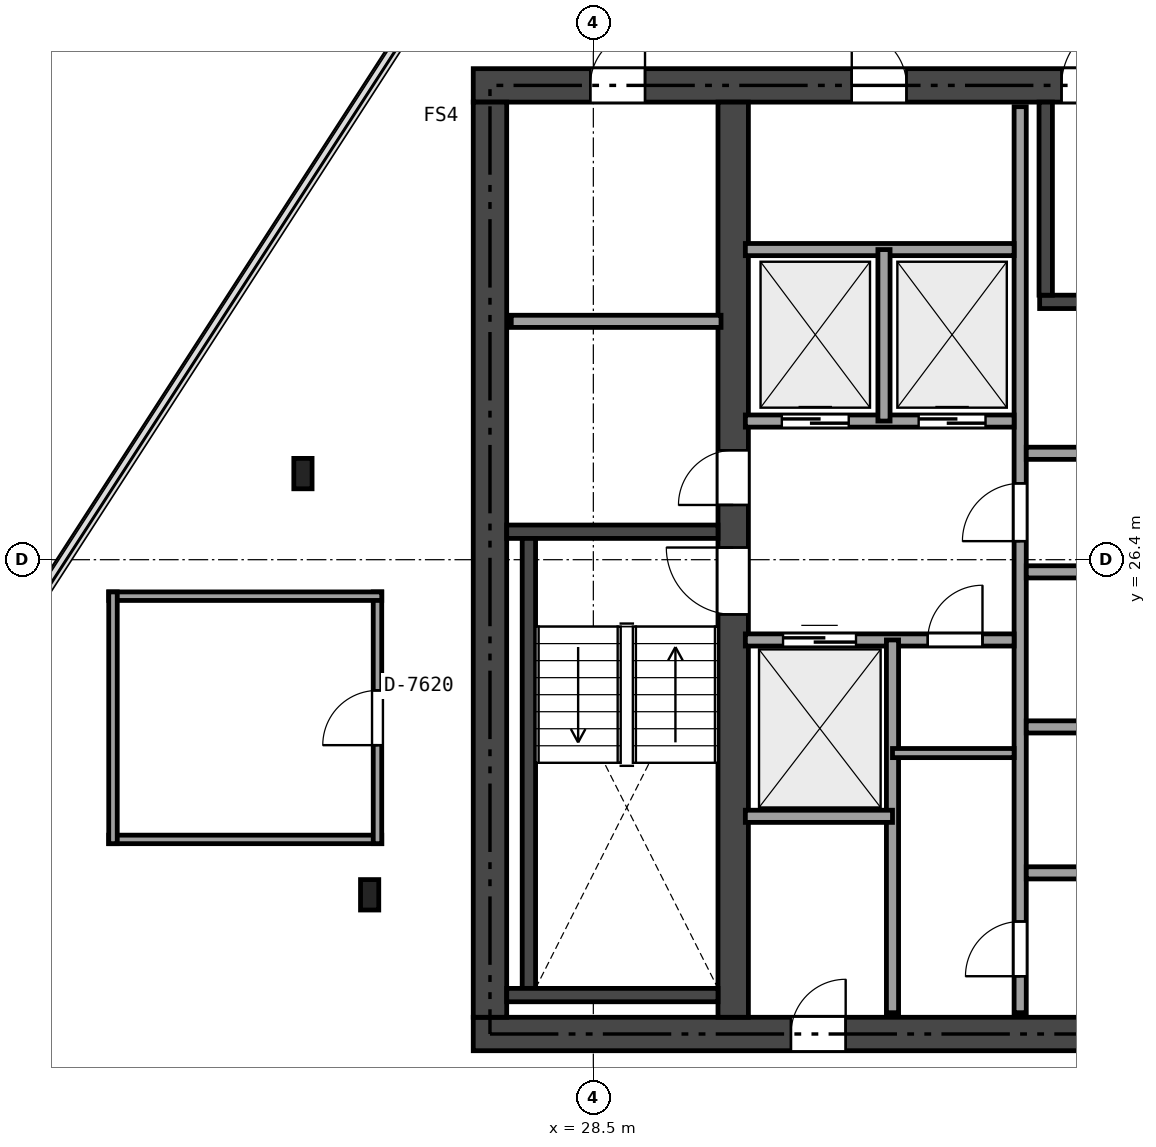
"""IFC4 building model, lengths in metres.
Left out: names, types, materials, properties, quantities, classifications, styles, units other than length and angle.
Written with IfcOpenShell. Run it as: python <this file> out.ifc"""

import sys

from ifc_helpers import new_model, si_unit, direction, frame, frame_2d, origin, origin_2d, place, context, subcontext, project, spatial, rectangle, i_section, extrude, element, fill, save


model = new_model("IFC4")
c1 = context("Model", 3, precision=1e-05, world=origin(), true_north=direction((0.0, 1.0)))
c2 = subcontext(c1, "Body", "Model", "MODEL_VIEW")
j1 = project(units=[si_unit("LENGTHUNIT", "METRE"), si_unit("PLANEANGLEUNIT", "RADIAN")], contexts=[c1])
p1 = place(None, origin())
s1 = spatial("IfcSite", under=j1, at=p1, CompositionType="ELEMENT")
p2 = place(p1, origin())
s2 = spatial("IfcBuilding", under=s1, at=p2, CompositionType="ELEMENT")
p3 = place(p2, frame((0.0, 0.0, 283.5)))
s3 = spatial("IfcBuildingStorey", under=s2, at=p3, CompositionType="ELEMENT", Elevation=283.5)
p4 = place(p3, frame((26.525, 18.6, 0.0), z_axis=(0.0, 0.0, 1.0), x_axis=(1.0, 0.0, 0.0)))
e1 = element("IfcWall", 1, at=p4, inside=s3, PredefinedType="SHEAR", context=c2, shape_type="SweptSolid", body=[
    extrude(rectangle(XDim=21.35, YDim=0.55, at=frame_2d((10.675, 0.0))), origin(), (0.0, 0.0, 1.0), 2.84),
])
p5 = place(p4, frame((12.4, 0.0, 0.0)))
e2 = element("IfcOpeningElement", 2, at=p5, cuts=e1, PredefinedType="OPENING", context=c2, shape_type="SweptSolid", body=[
    extrude(rectangle(XDim=1.15, YDim=2.15, at=frame_2d((0.575, 1.075))), frame((0.0, 0.285, 0.0), z_axis=(0.0, -1.0, 0.0), x_axis=(1.0, 0.0, 0.0)), (0.0, 0.0, 1.0), 0.57),
])
p6 = place(p4, frame((5.225, 0.0, 0.0)))
e3 = element("IfcOpeningElement", 3, at=p6, cuts=e1, PredefinedType="OPENING", context=c2, shape_type="SweptSolid", body=[
    extrude(rectangle(XDim=0.9, YDim=2.1, at=frame_2d((0.45, 1.05))), frame((0.0, 0.285, 0.0), z_axis=(0.0, -1.0, 0.0), x_axis=(1.0, 0.0, 0.0)), (0.0, 0.0, 1.0), 0.57),
])
p7 = place(p3, frame((26.525, 34.2, 0.0), z_axis=(0.0, 0.0, 1.0), x_axis=(1.0, 0.0, 0.0)))
e4 = element("IfcWall", 4, at=p7, inside=s3, PredefinedType="SHEAR", context=c2, shape_type="SweptSolid", body=[
    extrude(rectangle(XDim=21.35, YDim=0.55, at=frame_2d((10.675, 0.0))), origin(), (0.0, 0.0, 1.0), 2.84),
])
p8 = place(p7, frame((9.675, 0.0, 0.0)))
e5 = element("IfcOpeningElement", 5, at=p8, cuts=e4, PredefinedType="OPENING", context=c2, shape_type="SweptSolid", body=[
    extrude(rectangle(XDim=1.1, YDim=2.15, at=frame_2d((0.55, 1.075))), frame((0.0, 0.285, 0.0), z_axis=(0.0, -1.0, 0.0), x_axis=(1.0, 0.0, 0.0)), (0.0, 0.0, 1.0), 0.57),
])
p9 = place(p7, frame((1.925, 0.0, 0.0)))
e6 = element("IfcOpeningElement", 6, at=p9, cuts=e4, PredefinedType="OPENING", context=c2, shape_type="SweptSolid", body=[
    extrude(rectangle(XDim=0.9, YDim=2.1, at=frame_2d((0.45, 1.05))), frame((0.0, 0.285, 0.0), z_axis=(0.0, -1.0, 0.0), x_axis=(1.0, 0.0, 0.0)), (0.0, 0.0, 1.0), 0.57),
])
p10 = place(p7, frame((6.225, 0.0, 0.0)))
e7 = element("IfcOpeningElement", 7, at=p10, cuts=e4, PredefinedType="OPENING", context=c2, shape_type="SweptSolid", body=[
    extrude(rectangle(XDim=0.9, YDim=2.1, at=frame_2d((0.45, 1.05))), frame((0.0, 0.285, 0.0), z_axis=(0.0, -1.0, 0.0), x_axis=(1.0, 0.0, 0.0)), (0.0, 0.0, 1.0), 0.57),
])
p11 = place(p3, frame((26.8, 18.875, 0.0), z_axis=(0.0, 0.0, 1.0), x_axis=(0.0, 1.0, 0.0)))
e8 = element("IfcWall", 8, at=p11, inside=s3, PredefinedType="SHEAR", context=c2, shape_type="SweptSolid", body=[
    extrude(rectangle(XDim=15.05, YDim=0.55, at=frame_2d((7.525, 0.0))), origin(), (0.0, 0.0, 1.0), 2.84),
])
p12 = place(p3, frame((30.8, 18.875, 0.0), z_axis=(0.0, 0.0, 1.0), x_axis=(0.0, 1.0, 0.0)))
e9 = element("IfcWall", 9, at=p12, inside=s3, PredefinedType="SHEAR", context=c2, shape_type="SweptSolid", body=[
    extrude(rectangle(XDim=15.05, YDim=0.5, at=frame_2d((7.525, 0.0))), origin(), (0.0, 0.0, 1.0), 2.84),
])
p13 = place(p12, frame((6.625, 0.0, 0.0)))
e10 = element("IfcOpeningElement", 10, at=p13, cuts=e9, PredefinedType="OPENING", context=c2, shape_type="SweptSolid", body=[
    extrude(rectangle(XDim=1.1, YDim=2.15, at=frame_2d((0.55, 1.075))), frame((0.0, 0.26, 0.0), z_axis=(0.0, -1.0, 0.0), x_axis=(1.0, 0.0, 0.0)), (0.0, 0.0, 1.0), 0.52),
])
p14 = place(p12, frame((8.425, 0.0, 0.0)))
e11 = element("IfcOpeningElement", 11, at=p14, cuts=e9, PredefinedType="OPENING", context=c2, shape_type="SweptSolid", body=[
    extrude(rectangle(XDim=0.9, YDim=2.1, at=frame_2d((0.45, 1.05))), frame((0.0, 0.26, 0.0), z_axis=(0.0, -1.0, 0.0), x_axis=(1.0, 0.0, 0.0)), (0.0, 0.0, 1.0), 0.52),
])
p15 = place(p3, frame((27.075, 26.86, 0.0), z_axis=(0.0, 0.0, 1.0), x_axis=(1.0, 0.0, 0.0)))
e12 = element("IfcWall", 12, at=p15, inside=s3, PredefinedType="SHEAR", context=c2, shape_type="SweptSolid", body=[
    extrude(rectangle(XDim=3.475, YDim=0.22, at=frame_2d((1.738, 0.0))), origin(), (0.0, 0.0, 1.0), 2.84),
])
p16 = place(p3, frame((27.44, 19.35, 0.0), z_axis=(0.0, 0.0, 1.0), x_axis=(0.0, 1.0, 0.0)))
e13 = element("IfcWall", 13, at=p16, inside=s3, PredefinedType="SHEAR", context=c2, shape_type="SweptSolid", body=[
    extrude(rectangle(XDim=7.4, YDim=0.22, at=frame_2d((3.7, 0.0))), origin(), (0.0, 0.0, 1.0), 2.84),
])
p17 = place(p3, frame((27.075, 19.24, 0.0), z_axis=(0.0, 0.0, 1.0), x_axis=(1.0, 0.0, 0.0)))
e14 = element("IfcWall", 14, at=p17, inside=s3, PredefinedType="SHEAR", context=c2, shape_type="SweptSolid", body=[
    extrude(rectangle(XDim=3.475, YDim=0.22, at=frame_2d((1.738, 0.0))), origin(), (0.0, 0.0, 1.0), 2.84),
])
p18 = place(p3, frame((35.84, 30.64, 0.0), z_axis=(0.0, 0.0, 1.0), x_axis=(1.0, 0.0, 0.0)))
e15 = element("IfcWall", 15, at=p18, inside=s3, PredefinedType="SHEAR", context=c2, shape_type="SweptSolid", body=[
    extrude(rectangle(XDim=7.61, YDim=0.22, at=frame_2d((3.805, 0.0))), origin(), (0.0, 0.0, 1.0), 2.84),
])
p19 = place(p3, frame((35.94, 30.75, 0.0), z_axis=(0.0, 0.0, 1.0), x_axis=(0.0, 1.0, 0.0)))
e16 = element("IfcWall", 16, at=p19, inside=s3, PredefinedType="SHEAR", context=c2, shape_type="SweptSolid", body=[
    extrude(rectangle(XDim=3.175, YDim=0.22, at=frame_2d((1.587, 0.0))), origin(), (0.0, 0.0, 1.0), 2.84),
])
for number, where, z_axis, x_axis in (
    (17, (23.724, 27.816, 0.0), (0.0, 0.0, 1.0), (1.0, 0.0, 0.0)),
    (18, (24.821, 20.889, 0.0), (0.0, 0.0, 1.0), (1.0, 0.0, 0.0)),
):
    element("IfcColumn", number, at=place(p3, frame(where, z_axis=z_axis, x_axis=x_axis)), inside=s3, PredefinedType="COLUMN", context=c2, shape_type="SweptSolid", body=[
        extrude(i_section(OverallWidth=0.3, OverallDepth=0.5, WebThickness=0.015, FlangeThickness=0.028, at=origin_2d()), origin(), (0.0, 0.0, 1.0), 2.84),
    ])
p20 = place(p3, frame((27.15, 30.32, 0.0), z_axis=(0.0, 0.0, 1.0), x_axis=(1.0, 0.0, 0.0)))
e19 = element("IfcWall", 19, at=p20, inside=s3, PredefinedType="SOLIDWALL", context=c2, shape_type="SweptSolid", body=[
    extrude(rectangle(XDim=3.45, YDim=0.2, at=frame_2d((1.725, 0.0))), origin(), (0.0, 0.0, 1.0), 2.84),
])
p21 = place(p3, frame((35.52, 18.95, 0.0), z_axis=(0.0, 0.0, 1.0), x_axis=(0.0, 1.0, 0.0)))
e20 = element("IfcWall", 20, at=p21, inside=s3, PredefinedType="SOLIDWALL", context=c2, shape_type="SweptSolid", body=[
    extrude(rectangle(XDim=14.9, YDim=0.2, at=frame_2d((7.45, 0.0))), origin(), (0.0, 0.0, 1.0), 2.361),
])
p22 = place(p21, frame((7.755, 0.0, 0.0)))
e21 = element("IfcOpeningElement", 21, at=p22, cuts=e20, PredefinedType="OPENING", context=c2, shape_type="SweptSolid", body=[
    extrude(rectangle(XDim=0.95, YDim=2.15, at=frame_2d((0.475, 1.075))), frame((0.0, 0.11, 0.0), z_axis=(0.0, -1.0, 0.0), x_axis=(1.0, 0.0, 0.0)), (0.0, 0.0, 1.0), 0.22),
])
p23 = place(p21, frame((0.6, 0.0, 0.0)))
e22 = element("IfcOpeningElement", 22, at=p23, cuts=e20, PredefinedType="OPENING", context=c2, shape_type="SweptSolid", body=[
    extrude(rectangle(XDim=0.9, YDim=2.1, at=frame_2d((0.45, 1.05))), frame((0.0, 0.11, 0.0), z_axis=(0.0, -1.0, 0.0), x_axis=(1.0, 0.0, 0.0)), (0.0, 0.0, 1.0), 0.22),
])
p24 = place(p3, frame((31.0, 28.68, 0.0), z_axis=(0.0, 0.0, 1.0), x_axis=(1.0, 0.0, 0.0)))
e23 = element("IfcWall", 23, at=p24, inside=s3, PredefinedType="SOLIDWALL", context=c2, shape_type="SweptSolid", body=[
    extrude(rectangle(XDim=4.42, YDim=0.2, at=frame_2d((2.21, 0.0))), origin(), (0.0, 0.0, 1.0), 2.84),
])
p25 = place(p24, frame((0.6, 0.0, 0.0)))
e24 = element("IfcOpeningElement", 24, at=p25, cuts=e23, PredefinedType="OPENING", context=c2, shape_type="SweptSolid", body=[
    extrude(rectangle(XDim=1.1, YDim=2.15, at=frame_2d((0.55, 1.075))), frame((0.0, 0.11, 0.0), z_axis=(0.0, -1.0, 0.0), x_axis=(1.0, 0.0, 0.0)), (0.0, 0.0, 1.0), 0.22),
])
p26 = place(p24, frame((2.85, 0.0, 0.0)))
e25 = element("IfcOpeningElement", 25, at=p26, cuts=e23, PredefinedType="OPENING", context=c2, shape_type="SweptSolid", body=[
    extrude(rectangle(XDim=1.1, YDim=2.15, at=frame_2d((0.55, 1.075))), frame((0.0, 0.11, 0.0), z_axis=(0.0, -1.0, 0.0), x_axis=(1.0, 0.0, 0.0)), (0.0, 0.0, 1.0), 0.22),
])
p27 = place(p3, frame((31.0, 31.5, 0.0), z_axis=(0.0, 0.0, 1.0), x_axis=(1.0, 0.0, 0.0)))
e26 = element("IfcWall", 26, at=p27, inside=s3, PredefinedType="SOLIDWALL", context=c2, shape_type="SweptSolid", body=[
    extrude(rectangle(XDim=4.42, YDim=0.2, at=frame_2d((2.21, 0.0))), origin(), (0.0, 0.0, 1.0), 2.84),
])
p28 = place(p3, frame((33.28, 28.68, 0.0), z_axis=(0.0, 0.0, 1.0), x_axis=(0.0, 1.0, 0.0)))
e27 = element("IfcWall", 27, at=p28, inside=s3, PredefinedType="SOLIDWALL", context=c2, shape_type="SweptSolid", body=[
    extrude(rectangle(XDim=2.82, YDim=0.2, at=frame_2d((1.41, 0.0))), origin(), (0.0, 0.0, 1.0), 2.84),
])
p29 = place(p3, frame((31.0, 25.08, 0.0), z_axis=(0.0, 0.0, 1.0), x_axis=(1.0, 0.0, 0.0)))
e28 = element("IfcWall", 28, at=p29, inside=s3, PredefinedType="SOLIDWALL", context=c2, shape_type="SweptSolid", body=[
    extrude(rectangle(XDim=4.42, YDim=0.2, at=frame_2d((2.21, 0.0))), origin(), (0.0, 0.0, 1.0), 2.84),
])
p30 = place(p29, frame((3.0, 0.0, 0.0)))
e29 = element("IfcOpeningElement", 29, at=p30, cuts=e28, PredefinedType="OPENING", context=c2, shape_type="SweptSolid", body=[
    extrude(rectangle(XDim=0.9, YDim=2.1, at=frame_2d((0.45, 1.05))), frame((0.0, 0.11, 0.0), z_axis=(0.0, -1.0, 0.0), x_axis=(1.0, 0.0, 0.0)), (0.0, 0.0, 1.0), 0.22),
])
p31 = place(p29, frame((0.62, 0.0, 0.0)))
e30 = element("IfcOpeningElement", 30, at=p31, cuts=e28, PredefinedType="OPENING", context=c2, shape_type="SweptSolid", body=[
    extrude(rectangle(XDim=1.2, YDim=2.15, at=frame_2d((0.6, 1.075))), frame((0.0, 0.11, 0.0), z_axis=(0.0, -1.0, 0.0), x_axis=(1.0, 0.0, 0.0)), (0.0, 0.0, 1.0), 0.22),
])
p32 = place(p3, frame((33.42, 18.95, 0.0), z_axis=(0.0, 0.0, 1.0), x_axis=(0.0, 1.0, 0.0)))
e31 = element("IfcWall", 31, at=p32, inside=s3, PredefinedType="SOLIDWALL", context=c2, shape_type="SweptSolid", body=[
    extrude(rectangle(XDim=6.13, YDim=0.2, at=frame_2d((3.065, 0.0))), origin(), (0.0, 0.0, 1.0), 2.361),
])
p33 = place(p3, frame((31.0, 22.18, 0.0), z_axis=(0.0, 0.0, 1.0), x_axis=(1.0, 0.0, 0.0)))
e32 = element("IfcWall", 32, at=p33, inside=s3, PredefinedType="SOLIDWALL", context=c2, shape_type="SweptSolid", body=[
    extrude(rectangle(XDim=2.42, YDim=0.2, at=frame_2d((1.21, 0.0))), origin(), (0.0, 0.0, 1.0), 2.84),
])
p34 = place(p3, frame((33.42, 23.22, 0.0), z_axis=(0.0, 0.0, 1.0), x_axis=(1.0, 0.0, 0.0)))
e33 = element("IfcWall", 33, at=p34, inside=s3, PredefinedType="PARTITIONING", context=c2, shape_type="SweptSolid", body=[
    extrude(rectangle(XDim=2.0, YDim=0.15, at=frame_2d((1.0, 0.0))), origin(), (0.0, 0.0, 1.0), 2.84),
])
p35 = place(p3, frame((35.62, 28.15, 0.0), z_axis=(0.0, 0.0, 1.0), x_axis=(1.0, 0.0, 0.0)))
e34 = element("IfcWall", 34, at=p35, inside=s3, PredefinedType="SOLIDWALL", context=c2, shape_type="SweptSolid", body=[
    extrude(rectangle(XDim=7.88, YDim=0.2, at=frame_2d((3.94, 0.0))), origin(), (0.0, 0.0, 1.0), 2.84),
])
p36 = place(p3, frame((35.62, 26.2, 0.0), z_axis=(0.0, 0.0, 1.0), x_axis=(1.0, 0.0, 0.0)))
e35 = element("IfcWall", 35, at=p36, inside=s3, PredefinedType="SOLIDWALL", context=c2, shape_type="SweptSolid", body=[
    extrude(rectangle(XDim=7.88, YDim=0.2, at=frame_2d((3.94, 0.0))), origin(), (0.0, 0.0, 1.0), 2.84),
])
p37 = place(p36, frame((1.13, 0.0, 0.0)))
e36 = element("IfcOpeningElement", 36, at=p37, cuts=e35, PredefinedType="OPENING", context=c2, shape_type="SweptSolid", body=[
    extrude(rectangle(XDim=0.9, YDim=2.1, at=frame_2d((0.45, 1.05))), frame((0.0, 0.11, 0.0), z_axis=(0.0, -1.0, 0.0), x_axis=(1.0, 0.0, 0.0)), (0.0, 0.0, 1.0), 0.22),
])
p38 = place(p36, frame((5.73, 0.0, 0.0)))
e37 = element("IfcOpeningElement", 37, at=p38, cuts=e35, PredefinedType="OPENING", context=c2, shape_type="SweptSolid", body=[
    extrude(rectangle(XDim=0.9, YDim=2.1, at=frame_2d((0.45, 1.05))), frame((0.0, 0.11, 0.0), z_axis=(0.0, -1.0, 0.0), x_axis=(1.0, 0.0, 0.0)), (0.0, 0.0, 1.0), 0.22),
])
p39 = place(p3, frame((35.62, 23.65, 0.0), z_axis=(0.0, 0.0, 1.0), x_axis=(1.0, 0.0, 0.0)))
e38 = element("IfcWall", 38, at=p39, inside=s3, PredefinedType="SOLIDWALL", context=c2, shape_type="SweptSolid", body=[
    extrude(rectangle(XDim=7.88, YDim=0.2, at=frame_2d((3.94, 0.0))), origin(), (0.0, 0.0, 1.0), 2.361),
])
p40 = place(p3, frame((35.62, 21.25, 0.0), z_axis=(0.0, 0.0, 1.0), x_axis=(1.0, 0.0, 0.0)))
e39 = element("IfcWall", 39, at=p40, inside=s3, PredefinedType="SOLIDWALL", context=c2, shape_type="SweptSolid", body=[
    extrude(rectangle(XDim=7.88, YDim=0.2, at=frame_2d((3.94, 0.0))), origin(), (0.0, 0.0, 1.0), 2.84),
])
p41 = place(p40, frame((1.13, 0.0, 0.0)))
e40 = element("IfcOpeningElement", 40, at=p41, cuts=e39, PredefinedType="OPENING", context=c2, shape_type="SweptSolid", body=[
    extrude(rectangle(XDim=0.9, YDim=2.1, at=frame_2d((0.45, 1.05))), frame((0.0, 0.11, 0.0), z_axis=(0.0, -1.0, 0.0), x_axis=(1.0, 0.0, 0.0)), (0.0, 0.0, 1.0), 0.22),
])
p42 = place(p40, frame((5.73, 0.0, 0.0)))
e41 = element("IfcOpeningElement", 41, at=p42, cuts=e39, PredefinedType="OPENING", context=c2, shape_type="SweptSolid", body=[
    extrude(rectangle(XDim=0.9, YDim=2.1, at=frame_2d((0.45, 1.05))), frame((0.0, 0.11, 0.0), z_axis=(0.0, -1.0, 0.0), x_axis=(1.0, 0.0, 0.0)), (0.0, 0.0, 1.0), 0.22),
])
p43 = place(p3, frame((20.53, 21.8, 0.0), z_axis=(0.0, 0.0, 1.0), x_axis=(1.0, 0.0, 0.0)))
e42 = element("IfcWall", 42, at=p43, inside=s3, PredefinedType="PARTITIONING", context=c2, shape_type="SweptSolid", body=[
    extrude(rectangle(XDim=4.49, YDim=0.14, at=frame_2d((2.245, 0.0))), origin(), (0.0, 0.0, 1.0), 2.365),
])
p44 = place(p3, frame((24.95, 21.73, 0.0), z_axis=(0.0, 0.0, 1.0), x_axis=(0.0, 1.0, 0.0)))
e43 = element("IfcWall", 43, at=p44, inside=s3, PredefinedType="PARTITIONING", context=c2, shape_type="SweptSolid", body=[
    extrude(rectangle(XDim=4.14, YDim=0.14, at=frame_2d((2.07, 0.0))), origin(), (0.0, 0.0, 1.0), 2.84),
])
p45 = place(p44, frame((1.62, 0.0, 0.0)))
e44 = element("IfcOpeningElement", 44, at=p45, cuts=e43, PredefinedType="OPENING", context=c2, shape_type="SweptSolid", body=[
    extrude(rectangle(XDim=0.9, YDim=2.0, at=frame_2d((0.45, 1.0))), frame((0.0, 0.08, 0.0), z_axis=(0.0, -1.0, 0.0), x_axis=(1.0, 0.0, 0.0)), (0.0, 0.0, 1.0), 0.16),
])
p46 = place(p3, frame((25.02, 25.8, 0.0), z_axis=(0.0, 0.0, 1.0), x_axis=(-1.0, 0.0, 0.0)))
e45 = element("IfcWall", 45, at=p46, inside=s3, PredefinedType="PARTITIONING", context=c2, shape_type="SweptSolid", body=[
    extrude(rectangle(XDim=4.49, YDim=0.14, at=frame_2d((2.245, 0.0))), origin(), (0.0, 0.0, 1.0), 2.365),
])
p47 = place(p3, frame((20.6, 25.87, 0.0), z_axis=(0.0, 0.0, 1.0), x_axis=(0.0, -1.0, 0.0)))
e46 = element("IfcWall", 46, at=p47, inside=s3, PredefinedType="PARTITIONING", context=c2, shape_type="SweptSolid", body=[
    extrude(rectangle(XDim=4.14, YDim=0.14, at=frame_2d((2.07, 0.0))), origin(), (0.0, 0.0, 1.0), 2.84),
])
p48 = place(p13, origin())
e47 = element("IfcDoor", 47, at=p48, inside=s3, OperationType="SINGLE_SWING_RIGHT", PredefinedType="DOOR", context=c2, shape_type="SweptSolid", body=[
    extrude(rectangle(XDim=1.1, YDim=2.15, at=frame_2d((0.55, 1.075))), frame((0.0, 0.025, 0.0), z_axis=(0.0, -1.0, 0.0), x_axis=(1.0, 0.0, 0.0)), (0.0, 0.0, 1.0), 0.05),
])
fill(e10, e47)
p49 = place(p8, origin())
e48 = element("IfcDoor", 48, at=p49, inside=s3, OperationType="SINGLE_SWING_RIGHT", PredefinedType="DOOR", context=c2, shape_type="SweptSolid", body=[
    extrude(rectangle(XDim=1.1, YDim=2.15, at=frame_2d((0.55, 1.075))), frame((0.0, 0.025, 0.0), z_axis=(0.0, -1.0, 0.0), x_axis=(1.0, 0.0, 0.0)), (0.0, 0.0, 1.0), 0.05),
])
fill(e5, e48)
p50 = place(p22, origin())
e49 = element("IfcDoor", 49, at=p50, inside=s3, OperationType="SINGLE_SWING_LEFT", PredefinedType="DOOR", context=c2, shape_type="SweptSolid", body=[
    extrude(rectangle(XDim=0.95, YDim=2.15, at=frame_2d((0.475, 1.075))), frame((0.0, 0.025, 0.0), z_axis=(0.0, -1.0, 0.0), x_axis=(1.0, 0.0, 0.0)), (0.0, 0.0, 1.0), 0.05),
])
fill(e21, e49)
p51 = place(p14, origin())
e50 = element("IfcDoor", 50, at=p51, inside=s3, OperationType="SINGLE_SWING_LEFT", PredefinedType="DOOR", context=c2, shape_type="SweptSolid", body=[
    extrude(rectangle(XDim=0.9, YDim=2.1, at=frame_2d((0.45, 1.05))), frame((0.0, 0.025, 0.0), z_axis=(0.0, -1.0, 0.0), x_axis=(1.0, 0.0, 0.0)), (0.0, 0.0, 1.0), 0.05),
])
fill(e11, e50)
p52 = place(p9, origin())
e51 = element("IfcDoor", 51, at=p52, inside=s3, OperationType="SINGLE_SWING_RIGHT", PredefinedType="DOOR", context=c2, shape_type="SweptSolid", body=[
    extrude(rectangle(XDim=0.9, YDim=2.1, at=frame_2d((0.45, 1.05))), frame((0.0, 0.025, 0.0), z_axis=(0.0, -1.0, 0.0), x_axis=(1.0, 0.0, 0.0)), (0.0, 0.0, 1.0), 0.05),
])
fill(e6, e51)
p53 = place(p10, origin())
e52 = element("IfcDoor", 52, at=p53, inside=s3, OperationType="SINGLE_SWING_LEFT", PredefinedType="DOOR", context=c2, shape_type="SweptSolid", body=[
    extrude(rectangle(XDim=0.9, YDim=2.1, at=frame_2d((0.45, 1.05))), frame((0.0, 0.025, 0.0), z_axis=(0.0, -1.0, 0.0), x_axis=(1.0, 0.0, 0.0)), (0.0, 0.0, 1.0), 0.05),
])
fill(e7, e52)
p54 = place(p6, origin())
e53 = element("IfcDoor", 53, at=p54, inside=s3, OperationType="SINGLE_SWING_RIGHT", PredefinedType="DOOR", context=c2, shape_type="SweptSolid", body=[
    extrude(rectangle(XDim=0.9, YDim=2.1, at=frame_2d((0.45, 1.05))), frame((0.0, 0.025, 0.0), z_axis=(0.0, -1.0, 0.0), x_axis=(1.0, 0.0, 0.0)), (0.0, 0.0, 1.0), 0.05),
])
fill(e3, e53)
p55 = place(p23, origin())
e54 = element("IfcDoor", 54, at=p55, inside=s3, OperationType="SINGLE_SWING_LEFT", PredefinedType="DOOR", context=c2, shape_type="SweptSolid", body=[
    extrude(rectangle(XDim=0.9, YDim=2.1, at=frame_2d((0.45, 1.05))), frame((0.0, 0.025, 0.0), z_axis=(0.0, -1.0, 0.0), x_axis=(1.0, 0.0, 0.0)), (0.0, 0.0, 1.0), 0.05),
])
fill(e22, e54)
p56 = place(p30, origin())
e55 = element("IfcDoor", 55, at=p56, inside=s3, OperationType="SINGLE_SWING_RIGHT", PredefinedType="DOOR", context=c2, shape_type="SweptSolid", body=[
    extrude(rectangle(XDim=0.9, YDim=2.1, at=frame_2d((0.45, 1.05))), frame((0.0, 0.025, 0.0), z_axis=(0.0, -1.0, 0.0), x_axis=(1.0, 0.0, 0.0)), (0.0, 0.0, 1.0), 0.05),
])
fill(e29, e55)
p57 = place(p25, origin())
e56 = element("IfcDoor", 56, at=p57, inside=s3, OperationType="SLIDING_TO_LEFT", PredefinedType="DOOR", context=c2, shape_type="SweptSolid", body=[
    extrude(rectangle(XDim=1.1, YDim=2.15, at=frame_2d((0.55, 1.075))), frame((0.0, 0.025, 0.0), z_axis=(0.0, -1.0, 0.0), x_axis=(1.0, 0.0, 0.0)), (0.0, 0.0, 1.0), 0.05),
])
fill(e24, e56)
p58 = place(p26, origin())
e57 = element("IfcDoor", 57, at=p58, inside=s3, OperationType="SLIDING_TO_LEFT", PredefinedType="DOOR", context=c2, shape_type="SweptSolid", body=[
    extrude(rectangle(XDim=1.1, YDim=2.15, at=frame_2d((0.55, 1.075))), frame((0.0, 0.025, 0.0), z_axis=(0.0, -1.0, 0.0), x_axis=(1.0, 0.0, 0.0)), (0.0, 0.0, 1.0), 0.05),
])
fill(e25, e57)
p59 = place(p31, origin())
e58 = element("IfcDoor", 58, at=p59, inside=s3, OperationType="SLIDING_TO_LEFT", PredefinedType="DOOR", context=c2, shape_type="SweptSolid", body=[
    extrude(rectangle(XDim=1.2, YDim=2.15, at=frame_2d((0.6, 1.075))), frame((0.0, 0.025, 0.0), z_axis=(0.0, -1.0, 0.0), x_axis=(1.0, 0.0, 0.0)), (0.0, 0.0, 1.0), 0.05),
])
fill(e30, e58)
p60 = place(p45, origin())
e59 = element("IfcDoor", 59, at=p60, inside=s3, OperationType="SINGLE_SWING_LEFT", PredefinedType="DOOR", context=c2, shape_type="SweptSolid", body=[
    extrude(rectangle(XDim=0.9, YDim=2.0, at=frame_2d((0.45, 1.0))), frame((0.0, 0.025, 0.0), z_axis=(0.0, -1.0, 0.0), x_axis=(1.0, 0.0, 0.0)), (0.0, 0.0, 1.0), 0.05),
])
fill(e44, e59)
save(model, sys.argv[1])
